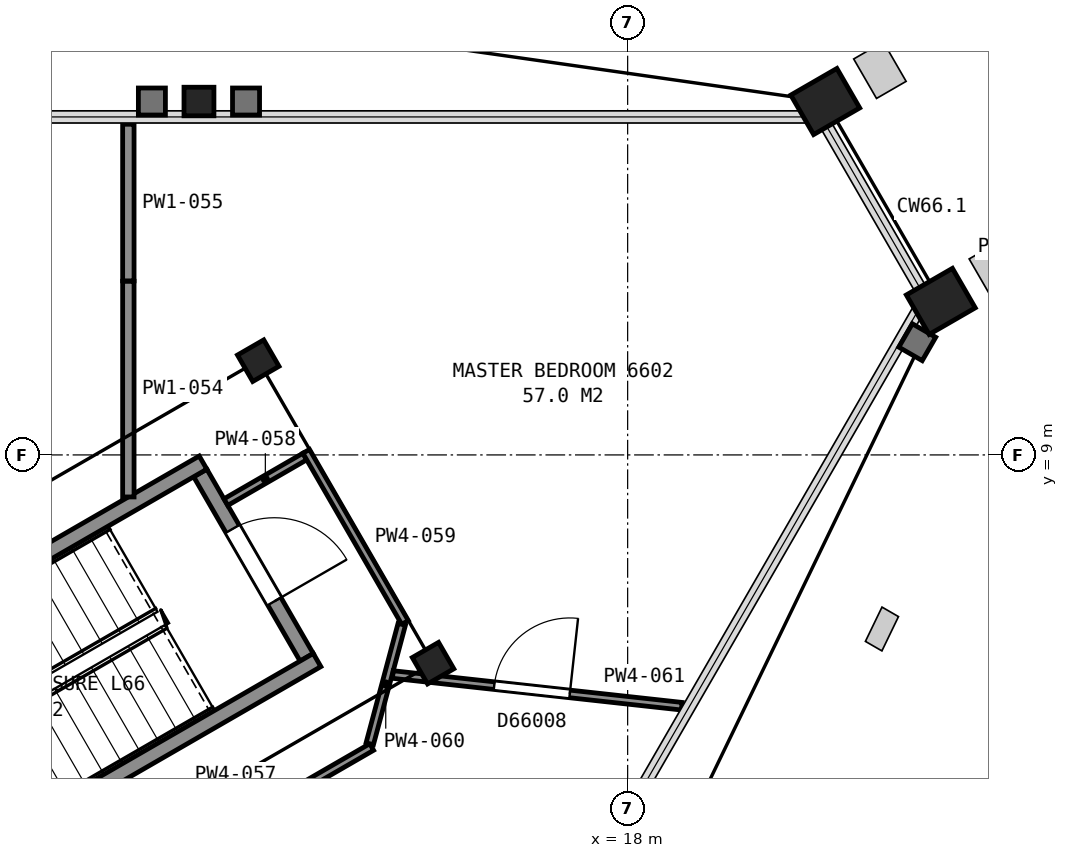
"""IFC4 building model, lengths in metres.
Left out: names, types, materials, properties, quantities, classifications, styles, units other than length and angle.
Written with IfcOpenShell. Run it as: python <this file> out.ifc"""

import sys

from ifc_helpers import new_model, si_unit, direction, frame, frame_2d, origin, origin_2d, place, context, subcontext, project, spatial, rectangle, hollow_rectangle, i_section, extrude, element, fill, save


model = new_model("IFC4")
c1 = context("Model", 3, precision=1e-05, world=origin(), true_north=direction((0.0, 1.0)))
c2 = subcontext(c1, "Body", "Model", "MODEL_VIEW")
j1 = project(units=[si_unit("LENGTHUNIT", "METRE"), si_unit("PLANEANGLEUNIT", "RADIAN")], contexts=[c1])
p1 = place(None, origin())
s1 = spatial("IfcSite", under=j1, at=p1, CompositionType="ELEMENT")
p2 = place(p1, origin())
s2 = spatial("IfcBuilding", under=s1, at=p2, CompositionType="ELEMENT")
p3 = place(p2, frame((0.0, 0.0, 264.0)))
s3 = spatial("IfcBuildingStorey", under=s2, at=p3, CompositionType="ELEMENT", Elevation=264.0)
p4 = place(p3, frame((20.6, 13.65, 0.0), z_axis=(0.0, 0.0, 1.0), x_axis=(0.5, -0.866025403784, 0.0)))
e1 = element("IfcColumn", 1, at=p4, inside=s3, PredefinedType="COLUMN", context=c2, shape_type="SweptSolid", body=[
    extrude(hollow_rectangle(XDim=0.6, YDim=0.7, WallThickness=0.04, at=origin_2d()), origin(), (0.0, 0.0, 1.0), 3.7),
])
p5 = place(p3, frame((12.36, 13.65, 0.0), z_axis=(0.0, 0.0, 1.0), x_axis=(1.0, 0.0, 0.0)))
e2 = element("IfcColumn", 2, at=p5, inside=s3, PredefinedType="COLUMN", context=c2, shape_type="SweptSolid", body=[
    extrude(i_section(OverallWidth=0.394, OverallDepth=0.376, WebThickness=0.017, FlangeThickness=0.028, FilletRadius=0.015, at=origin_2d()), origin(), (0.0, 0.0, 1.0), 3.7),
])
p6 = place(p3, frame((22.12, 11.02, 0.0), z_axis=(0.0, 0.0, 1.0), x_axis=(0.5, -0.866025403784, 0.0)))
e3 = element("IfcColumn", 3, at=p6, inside=s3, PredefinedType="COLUMN", context=c2, shape_type="SweptSolid", body=[
    extrude(hollow_rectangle(XDim=0.6, YDim=0.7, WallThickness=0.04, at=origin_2d()), origin(), (0.0, 0.0, 1.0), 3.7),
])
for number, where, z_axis, x_axis in (
    (4, (15.44, 6.26, 0.05), (0.0, 0.0, 1.0), (0.5, -0.866, 0.0)),
    (5, (13.14, 10.24, 0.05), (0.0, 0.0, 1.0), (0.5, -0.866, 0.0)),
):
    element("IfcColumn", number, at=place(p3, frame(where, z_axis=z_axis, x_axis=x_axis)), inside=s3, PredefinedType="COLUMN", context=c2, shape_type="SweptSolid", body=[
        extrude(i_section(OverallWidth=0.401, OverallDepth=0.399, WebThickness=0.025, FlangeThickness=0.04, FilletRadius=0.015, at=origin_2d()), origin(), (0.0, 0.0, 1.0), 3.65),
    ])
p7 = place(p3, frame((13.777, 6.338, 0.0), z_axis=(0.0, 0.0, 1.0), x_axis=(-0.500049511043, 0.865996816683, 0.0)))
e6 = element("IfcWall", 6, at=p7, inside=s3, PredefinedType="PARTITIONING", context=c2, shape_type="SweptSolid", body=[
    extrude(rectangle(XDim=2.8, YDim=0.2, at=frame_2d((1.4, 0.0))), origin(), (0.0, 0.0, 1.0), 3.45),
])
p8 = place(p7, frame((0.85, 0.0, 0.0)))
e7 = element("IfcOpeningElement", 7, at=p8, cuts=e6, PredefinedType="OPENING", context=c2, shape_type="SweptSolid", body=[
    extrude(rectangle(XDim=1.1, YDim=2.1, at=frame_2d((0.55, 1.05))), frame((0.0, 0.11, 0.0), z_axis=(0.0, -1.0, 0.0), x_axis=(1.0, 0.0, 0.0)), (0.0, 0.0, 1.0), 0.22),
])
for number, where, z_axis, x_axis in (
    (8, (6.178, 5.299, 0.0), (0.0, 0.0, 1.0), (0.866, 0.5, 0.0)),
    (9, (7.678, 2.701, 0.0), (0.0, 0.0, 1.0), (0.866, 0.5, 0.0)),
):
    element("IfcWall", number, at=place(p3, frame(where, z_axis=z_axis, x_axis=x_axis)), inside=s3, PredefinedType="PARTITIONING", context=c2, shape_type="SweptSolid", body=[
        extrude(rectangle(XDim=7.2, YDim=0.2, at=frame_2d((3.6, 0.0))), origin(), (0.0, 0.0, 1.0), 3.45),
    ])
p9 = place(p3, frame((11.431, 8.447, 0.0), z_axis=(0.0, 0.0, 1.0), x_axis=(0.0, 1.0, 0.0)))
e10 = element("IfcWall", 10, at=p9, inside=s3, PredefinedType="PARTITIONING", context=c2, shape_type="SweptSolid", body=[
    extrude(rectangle(XDim=2.838, YDim=0.15, at=frame_2d((1.419, 0.0))), origin(), (0.0, 0.0, 1.0), 2.723),
])
p10 = place(p3, frame((11.431, 11.29, 0.0), z_axis=(0.0, 0.0, 1.0), x_axis=(0.0, 1.0, 0.0)))
e11 = element("IfcWall", 11, at=p10, inside=s3, PredefinedType="PARTITIONING", context=c2, shape_type="SweptSolid", body=[
    extrude(rectangle(XDim=2.061, YDim=0.15, at=frame_2d((1.031, 0.0))), origin(), (0.0, 0.0, 1.0), 2.723),
])
p11 = place(p3, frame((12.156, 3.727, 0.0), z_axis=(0.0, 0.0, 1.0), x_axis=(0.866012137121, 0.500022977831, 0.0)))
e12 = element("IfcWall", 12, at=p11, inside=s3, PredefinedType="PARTITIONING", context=c2, shape_type="SweptSolid", body=[
    extrude(rectangle(XDim=2.86, YDim=0.1, at=frame_2d((1.43, 0.0))), origin(), (0.0, 0.0, 1.0), 2.723),
])
p12 = place(p3, frame((12.714, 8.379, 0.0), z_axis=(0.0, 0.0, 1.0), x_axis=(0.86585331735, 0.500297944063, 0.0)))
e13 = element("IfcWall", 13, at=p12, inside=s3, PredefinedType="PARTITIONING", context=c2, shape_type="SweptSolid", body=[
    extrude(rectangle(XDim=1.199, YDim=0.1, at=frame_2d((0.6, 0.0))), origin(), (0.0, 0.0, 1.0), 2.723),
])
p13 = place(p3, frame((13.771, 9.047, 0.0), z_axis=(0.0, 0.0, 1.0), x_axis=(0.500006934395, -0.866021400173, 0.0)))
e14 = element("IfcWall", 14, at=p13, inside=s3, PredefinedType="PARTITIONING", context=c2, shape_type="SweptSolid", body=[
    extrude(rectangle(XDim=2.6, YDim=0.1, at=frame_2d((1.3, 0.0))), origin(), (0.0, 0.0, 1.0), 2.723),
])
p14 = place(p3, frame((14.607, 5.2, 0.0), z_axis=(0.0, 0.0, 1.0), x_axis=(0.258531076101, 0.966002941346, 0.0)))
e15 = element("IfcWall", 15, at=p14, inside=s3, PredefinedType="PARTITIONING", context=c2, shape_type="SweptSolid", body=[
    extrude(rectangle(XDim=1.627, YDim=0.1, at=frame_2d((0.813, 0.0))), origin(), (0.0, 0.0, 1.0), 2.723),
])
p15 = place(p3, frame((14.911, 6.111, 0.0), z_axis=(0.0, 0.0, 1.0), x_axis=(0.994040808037, -0.10900858662, 0.0)))
e16 = element("IfcWall", 16, at=p15, inside=s3, PredefinedType="PARTITIONING", context=c2, shape_type="SweptSolid", body=[
    extrude(rectangle(XDim=3.823, YDim=0.1, at=frame_2d((1.912, 0.0))), origin(), (0.0, 0.0, 1.0), 2.723),
])
p16 = place(p15, frame((1.342, 0.0, 0.0)))
e17 = element("IfcOpeningElement", 17, at=p16, cuts=e16, PredefinedType="OPENING", context=c2, shape_type="SweptSolid", body=[
    extrude(rectangle(XDim=1.0, YDim=2.1, at=frame_2d((0.5, 1.05))), frame((0.0, 0.06, 0.0), z_axis=(0.0, -1.0, 0.0), x_axis=(1.0, 0.0, 0.0)), (0.0, 0.0, 1.0), 0.12),
])
p17 = place(p8, origin())
e18 = element("IfcDoor", 18, at=p17, inside=s3, OperationType="SINGLE_SWING_LEFT", PredefinedType="DOOR", context=c2, shape_type="SweptSolid", body=[
    extrude(rectangle(XDim=1.1, YDim=2.1, at=frame_2d((0.55, 1.05))), frame((0.0, 0.025, 0.0), z_axis=(0.0, -1.0, 0.0), x_axis=(1.0, 0.0, 0.0)), (0.0, 0.0, 1.0), 0.05),
])
fill(e7, e18)
p18 = place(p16, origin())
e19 = element("IfcDoor", 19, at=p18, inside=s3, OperationType="SINGLE_SWING_RIGHT", PredefinedType="DOOR", context=c2, shape_type="SweptSolid", body=[
    extrude(rectangle(XDim=1.0, YDim=2.1, at=frame_2d((0.5, 1.05))), frame((0.0, 0.025, 0.0), z_axis=(0.0, -1.0, 0.0), x_axis=(1.0, 0.0, 0.0)), (0.0, 0.0, 1.0), 0.05),
])
fill(e17, e19)
save(model, sys.argv[1])
